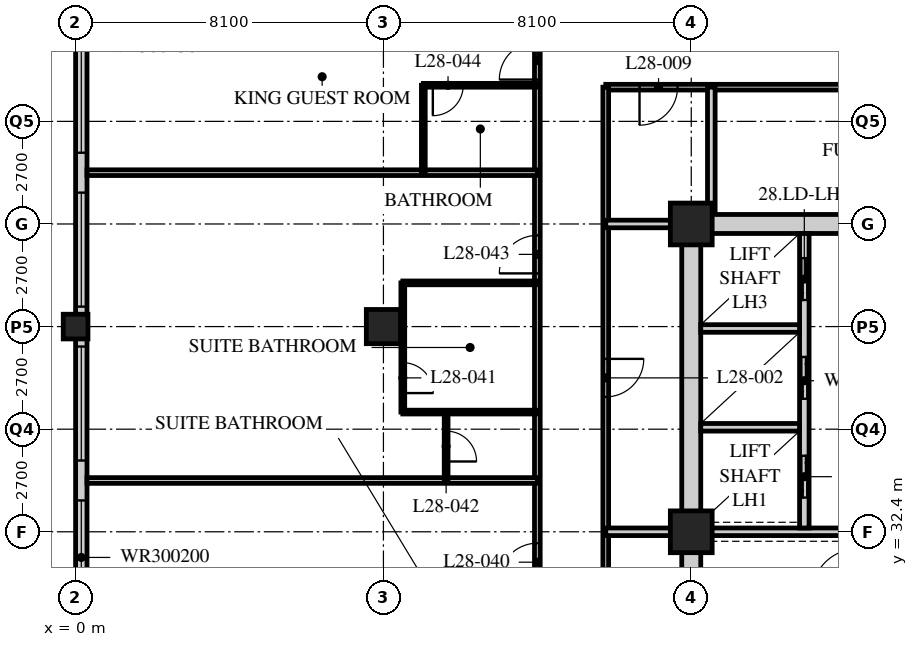
"""IFC4 building model, lengths in metres.
Left out: names, types, materials, properties, quantities, classifications, styles, units other than length and angle.
Written with IfcOpenShell. Run it as: python <this file> out.ifc"""

import sys

from ifc_helpers import new_model, si_unit, direction, frame, frame_2d, origin, origin_2d, place, context, subcontext, project, spatial, rectangle, hollow_rectangle, extrude, element, fill, save


model = new_model("IFC4")
c1 = context("Model", 3, precision=1e-05, world=origin(), true_north=direction((0.0, 1.0)))
c2 = subcontext(c1, "Body", "Model", "MODEL_VIEW")
j1 = project(units=[si_unit("LENGTHUNIT", "METRE"), si_unit("PLANEANGLEUNIT", "RADIAN")], contexts=[c1])
p1 = place(None, origin())
s1 = spatial("IfcSite", under=j1, at=p1, CompositionType="ELEMENT")
p2 = place(p1, origin())
s2 = spatial("IfcBuilding", under=s1, at=p2, CompositionType="ELEMENT")
p3 = place(p2, frame((0.0, 0.0, 113.6)))
s3 = spatial("IfcBuildingStorey", under=s2, at=p3, CompositionType="ELEMENT", Elevation=113.6)
p4 = place(p3, frame((0.0, 37.8, 0.0), z_axis=(0.0, 0.0, 1.0), x_axis=(1.0, 0.0, 0.0)))
e1 = element("IfcColumn", 1, at=p4, inside=s3, PredefinedType="COLUMN", context=c2, shape_type="SweptSolid", body=[
    extrude(hollow_rectangle(XDim=0.65, YDim=0.65, WallThickness=0.055, at=origin_2d()), origin(), (0.0, 0.0, 1.0), 3.4),
])
p5 = place(p3, frame((8.1, 37.8, 0.0), z_axis=(0.0, 0.0, 1.0), x_axis=(1.0, 0.0, 0.0)))
e2 = element("IfcColumn", 2, at=p5, inside=s3, PredefinedType="COLUMN", context=c2, shape_type="SweptSolid", body=[
    extrude(hollow_rectangle(XDim=0.9, YDim=0.9, WallThickness=0.09, at=origin_2d()), origin(), (0.0, 0.0, 1.0), 3.4),
])
for number, where, z_axis, x_axis in (
    (3, (16.2, 32.4, 0.0), (0.0, 0.0, 1.0), (1.0, 0.0, 0.0)),
    (4, (16.2, 40.5, 0.0), (0.0, 0.0, 1.0), (1.0, 0.0, 0.0)),
):
    element("IfcColumn", number, at=place(p3, frame(where, z_axis=z_axis, x_axis=x_axis)), inside=s3, PredefinedType="COLUMN", context=c2, shape_type="SweptSolid", body=[
        extrude(hollow_rectangle(XDim=1.1, YDim=1.1, WallThickness=0.1, at=origin_2d()), origin(), (0.0, 0.0, 1.0), 3.4),
    ])
p6 = place(p3, frame((0.15, 45.6, 0.0), z_axis=(0.0, 0.0, 1.0), x_axis=(0.0, -1.0, 0.0)))
e5 = element("IfcWall", 5, at=p6, inside=s3, PredefinedType="SOLIDWALL", context=c2, shape_type="SweptSolid", body=[
    extrude(rectangle(XDim=32.1, YDim=0.3, at=frame_2d((16.05, 0.0))), origin(), (0.0, 0.0, 1.0), 3.19),
])
p7 = place(p6, frame((0.225, 0.0, 0.9)))
e6 = element("IfcOpeningElement", 6, at=p7, cuts=e5, PredefinedType="OPENING", context=c2, shape_type="SweptSolid", body=[
    extrude(rectangle(XDim=3.0, YDim=2.0, at=frame_2d((1.5, 1.0))), frame((0.0, 0.16, 0.0), z_axis=(0.0, -1.0, 0.0), x_axis=(1.0, 0.0, 0.0)), (0.0, 0.0, 1.0), 0.32),
])
p8 = place(p6, frame((4.275, 0.0, 0.9)))
e7 = element("IfcOpeningElement", 7, at=p8, cuts=e5, PredefinedType="OPENING", context=c2, shape_type="SweptSolid", body=[
    extrude(rectangle(XDim=3.0, YDim=2.0, at=frame_2d((1.5, 1.0))), frame((0.0, 0.16, 0.0), z_axis=(0.0, -1.0, 0.0), x_axis=(1.0, 0.0, 0.0)), (0.0, 0.0, 1.0), 0.32),
])
p9 = place(p6, frame((8.325, 0.0, 0.9)))
e8 = element("IfcOpeningElement", 8, at=p9, cuts=e5, PredefinedType="OPENING", context=c2, shape_type="SweptSolid", body=[
    extrude(rectangle(XDim=3.0, YDim=2.0, at=frame_2d((1.5, 1.0))), frame((0.0, 0.16, 0.0), z_axis=(0.0, -1.0, 0.0), x_axis=(1.0, 0.0, 0.0)), (0.0, 0.0, 1.0), 0.32),
])
p10 = place(p6, frame((12.375, 0.0, 0.9)))
e9 = element("IfcOpeningElement", 9, at=p10, cuts=e5, PredefinedType="OPENING", context=c2, shape_type="SweptSolid", body=[
    extrude(rectangle(XDim=3.0, YDim=2.0, at=frame_2d((1.5, 1.0))), frame((0.0, 0.16, 0.0), z_axis=(0.0, -1.0, 0.0), x_axis=(1.0, 0.0, 0.0)), (0.0, 0.0, 1.0), 0.32),
])
p11 = place(p6, frame((16.425, 0.0, 0.9)))
e10 = element("IfcOpeningElement", 10, at=p11, cuts=e5, PredefinedType="OPENING", context=c2, shape_type="SweptSolid", body=[
    extrude(rectangle(XDim=3.0, YDim=2.0, at=frame_2d((1.5, 1.0))), frame((0.0, 0.16, 0.0), z_axis=(0.0, -1.0, 0.0), x_axis=(1.0, 0.0, 0.0)), (0.0, 0.0, 1.0), 0.32),
])
p12 = place(p6, frame((20.475, 0.0, 0.9)))
e11 = element("IfcOpeningElement", 11, at=p12, cuts=e5, PredefinedType="OPENING", context=c2, shape_type="SweptSolid", body=[
    extrude(rectangle(XDim=3.0, YDim=2.0, at=frame_2d((1.5, 1.0))), frame((0.0, 0.16, 0.0), z_axis=(0.0, -1.0, 0.0), x_axis=(1.0, 0.0, 0.0)), (0.0, 0.0, 1.0), 0.32),
])
p13 = place(p6, frame((24.525, 0.0, 0.9)))
e12 = element("IfcOpeningElement", 12, at=p13, cuts=e5, PredefinedType="OPENING", context=c2, shape_type="SweptSolid", body=[
    extrude(rectangle(XDim=3.0, YDim=2.0, at=frame_2d((1.5, 1.0))), frame((0.0, 0.16, 0.0), z_axis=(0.0, -1.0, 0.0), x_axis=(1.0, 0.0, 0.0)), (0.0, 0.0, 1.0), 0.32),
])
p14 = place(p6, frame((28.575, 0.0, 0.9)))
e13 = element("IfcOpeningElement", 13, at=p14, cuts=e5, PredefinedType="OPENING", context=c2, shape_type="SweptSolid", body=[
    extrude(rectangle(XDim=3.0, YDim=2.0, at=frame_2d((1.5, 1.0))), frame((0.0, 0.16, 0.0), z_axis=(0.0, -1.0, 0.0), x_axis=(1.0, 0.0, 0.0)), (0.0, 0.0, 1.0), 0.32),
])
p15 = place(p3, frame((12.15, 17.55, 0.0), z_axis=(0.0, 0.0, 1.0), x_axis=(0.0, 1.0, 0.0)))
e14 = element("IfcWall", 14, at=p15, inside=s3, PredefinedType="PARTITIONING", context=c2, shape_type="SweptSolid", body=[
    extrude(rectangle(XDim=28.35, YDim=0.15, at=frame_2d((14.175, 0.0))), origin(), (0.0, 0.0, 1.0), 3.19),
])
p16 = place(p15, frame((5.45, 0.0, 0.0)))
e15 = element("IfcOpeningElement", 15, at=p16, cuts=e14, PredefinedType="OPENING", context=c2, shape_type="SweptSolid", body=[
    extrude(rectangle(XDim=1.0, YDim=2.1, at=frame_2d((0.5, 1.05))), frame((0.0, 0.085, 0.0), z_axis=(0.0, -1.0, 0.0), x_axis=(1.0, 0.0, 0.0)), (0.0, 0.0, 1.0), 0.17),
])
p17 = place(p15, frame((13.55, 0.0, 0.0)))
e16 = element("IfcOpeningElement", 16, at=p17, cuts=e14, PredefinedType="OPENING", context=c2, shape_type="SweptSolid", body=[
    extrude(rectangle(XDim=1.0, YDim=2.1, at=frame_2d((0.5, 1.05))), frame((0.0, 0.085, 0.0), z_axis=(0.0, -1.0, 0.0), x_axis=(1.0, 0.0, 0.0)), (0.0, 0.0, 1.0), 0.17),
])
p18 = place(p15, frame((21.65, 0.0, 0.0)))
e17 = element("IfcOpeningElement", 17, at=p18, cuts=e14, PredefinedType="OPENING", context=c2, shape_type="SweptSolid", body=[
    extrude(rectangle(XDim=1.0, YDim=2.1, at=frame_2d((0.5, 1.05))), frame((0.0, 0.085, 0.0), z_axis=(0.0, -1.0, 0.0), x_axis=(1.0, 0.0, 0.0)), (0.0, 0.0, 1.0), 0.17),
])
p19 = place(p15, frame((26.75, 0.0, 0.0)))
e18 = element("IfcOpeningElement", 18, at=p19, cuts=e14, PredefinedType="OPENING", context=c2, shape_type="SweptSolid", body=[
    extrude(rectangle(XDim=1.0, YDim=2.1, at=frame_2d((0.5, 1.05))), frame((0.0, 0.085, 0.0), z_axis=(0.0, -1.0, 0.0), x_axis=(1.0, 0.0, 0.0)), (0.0, 0.0, 1.0), 0.17),
])
p20 = place(p3, frame((27.14, 44.1, 0.0), z_axis=(0.0, 0.0, 1.0), x_axis=(-1.0, 0.0, 0.0)))
e19 = element("IfcWall", 19, at=p20, inside=s3, PredefinedType="PARTITIONING", context=c2, shape_type="SweptSolid", body=[
    extrude(rectangle(XDim=13.19, YDim=0.15, at=frame_2d((6.595, 0.0))), origin(), (0.0, 0.0, 1.0), 3.19),
])
p21 = place(p20, frame((11.301, 0.0, 0.0)))
e20 = element("IfcOpeningElement", 20, at=p21, cuts=e19, PredefinedType="OPENING", context=c2, shape_type="SweptSolid", body=[
    extrude(rectangle(XDim=1.0, YDim=2.1, at=frame_2d((0.5, 1.05))), frame((0.0, 0.085, 0.0), z_axis=(0.0, -1.0, 0.0), x_axis=(1.0, 0.0, 0.0)), (0.0, 0.0, 1.0), 0.17),
])
p22 = place(p20, frame((4.701, 0.0, 0.0)))
e21 = element("IfcOpeningElement", 21, at=p22, cuts=e19, PredefinedType="OPENING", context=c2, shape_type="SweptSolid", body=[
    extrude(rectangle(XDim=1.0, YDim=2.1, at=frame_2d((0.5, 1.05))), frame((0.0, 0.085, 0.0), z_axis=(0.0, -1.0, 0.0), x_axis=(1.0, 0.0, 0.0)), (0.0, 0.0, 1.0), 0.17),
])
p23 = place(p3, frame((13.95, 44.1, 0.0), z_axis=(0.0, 0.0, 1.0), x_axis=(0.0, -1.0, 0.0)))
e22 = element("IfcWall", 22, at=p23, inside=s3, PredefinedType="PARTITIONING", context=c2, shape_type="SweptSolid", body=[
    extrude(rectangle(XDim=24.75, YDim=0.15, at=frame_2d((12.375, 0.0))), origin(), (0.0, 0.0, 1.0), 3.19),
])
p24 = place(p23, frame((15.25, 0.0, 0.0)))
e23 = element("IfcOpeningElement", 23, at=p24, cuts=e22, PredefinedType="OPENING", context=c2, shape_type="SweptSolid", body=[
    extrude(rectangle(XDim=1.0, YDim=2.1, at=frame_2d((0.5, 1.05))), frame((0.0, 0.085, 0.0), z_axis=(0.0, -1.0, 0.0), x_axis=(1.0, 0.0, 0.0)), (0.0, 0.0, 1.0), 0.17),
])
p25 = place(p23, frame((7.15, 0.0, 0.0)))
e24 = element("IfcOpeningElement", 24, at=p25, cuts=e22, PredefinedType="OPENING", context=c2, shape_type="SweptSolid", body=[
    extrude(rectangle(XDim=1.0, YDim=2.1, at=frame_2d((0.5, 1.05))), frame((0.0, 0.085, 0.0), z_axis=(0.0, -1.0, 0.0), x_axis=(1.0, 0.0, 0.0)), (0.0, 0.0, 1.0), 0.17),
])
p26 = place(p3, frame((13.95, 32.4, 0.0), z_axis=(0.0, 0.0, 1.0), x_axis=(1.0, 0.0, 0.0)))
e25 = element("IfcWall", 25, at=p26, inside=s3, PredefinedType="SOLIDWALL", context=c2, shape_type="SweptSolid", body=[
    extrude(rectangle(XDim=2.25, YDim=0.2, at=frame_2d((1.125, 0.0))), origin(), (0.0, 0.0, 1.0), 3.19),
])
p27 = place(p3, frame((16.728, 44.1, 0.0), z_axis=(0.0, 0.0, 1.0), x_axis=(0.0, -1.0, 0.0)))
e26 = element("IfcWall", 26, at=p27, inside=s3, PredefinedType="SOLIDWALL", context=c2, shape_type="SweptSolid", body=[
    extrude(rectangle(XDim=3.6, YDim=0.2, at=frame_2d((1.8, 0.0))), origin(), (0.0, 0.0, 1.0), 3.19),
])
p28 = place(p3, frame((13.95, 40.5, 0.0), z_axis=(0.0, 0.0, 1.0), x_axis=(1.0, 0.0, 0.0)))
e27 = element("IfcWall", 27, at=p28, inside=s3, PredefinedType="SOLIDWALL", context=c2, shape_type="SweptSolid", body=[
    extrude(rectangle(XDim=2.25, YDim=0.2, at=frame_2d((1.125, 0.0))), origin(), (0.0, 0.0, 1.0), 3.19),
])
p29 = place(p3, frame((12.15, 33.75, 0.0), z_axis=(0.0, 0.0, 1.0), x_axis=(-1.0, 0.0, 0.0)))
e28 = element("IfcWall", 28, at=p29, inside=s3, PredefinedType="PARTITIONING", context=c2, shape_type="SweptSolid", body=[
    extrude(rectangle(XDim=11.85, YDim=0.15, at=frame_2d((5.925, 0.0))), origin(), (0.0, 0.0, 1.0), 3.19),
])
p30 = place(p3, frame((8.61, 35.55, 0.0), z_axis=(0.0, 0.0, 1.0), x_axis=(0.0, 1.0, 0.0)))
e29 = element("IfcWall", 29, at=p30, inside=s3, PredefinedType="PARTITIONING", context=c2, shape_type="SweptSolid", body=[
    extrude(rectangle(XDim=3.4, YDim=0.1, at=frame_2d((1.7, 0.0))), origin(), (0.0, 0.0, 1.0), 3.19),
])
p31 = place(p30, frame((0.5, 0.0, 0.0)))
e30 = element("IfcOpeningElement", 30, at=p31, cuts=e29, PredefinedType="OPENING", context=c2, shape_type="SweptSolid", body=[
    extrude(rectangle(XDim=0.8, YDim=2.1, at=frame_2d((0.4, 1.05))), frame((0.0, 0.06, 0.0), z_axis=(0.0, -1.0, 0.0), x_axis=(1.0, 0.0, 0.0)), (0.0, 0.0, 1.0), 0.12),
])
p32 = place(p3, frame((9.75, 33.75, 0.0), z_axis=(0.0, 0.0, 1.0), x_axis=(0.0, 1.0, 0.0)))
e31 = element("IfcWall", 31, at=p32, inside=s3, PredefinedType="PARTITIONING", context=c2, shape_type="SweptSolid", body=[
    extrude(rectangle(XDim=1.8, YDim=0.1, at=frame_2d((0.9, 0.0))), origin(), (0.0, 0.0, 1.0), 3.19),
])
p33 = place(p32, frame((0.5, 0.0, 0.0)))
e32 = element("IfcOpeningElement", 32, at=p33, cuts=e31, PredefinedType="OPENING", context=c2, shape_type="SweptSolid", body=[
    extrude(rectangle(XDim=0.8, YDim=2.1, at=frame_2d((0.4, 1.05))), frame((0.0, 0.06, 0.0), z_axis=(0.0, -1.0, 0.0), x_axis=(1.0, 0.0, 0.0)), (0.0, 0.0, 1.0), 0.12),
])
for number, where, z_axis, x_axis in (
    (33, (12.15, 35.55, 0.0), (0.0, 0.0, 1.0), (-1.0, 0.0, 0.0)),
    (34, (12.15, 38.95, 0.0), (0.0, 0.0, 1.0), (-1.0, 0.0, 0.0)),
):
    element("IfcWall", number, at=place(p3, frame(where, z_axis=z_axis, x_axis=x_axis)), inside=s3, PredefinedType="PARTITIONING", context=c2, shape_type="SweptSolid", body=[
        extrude(rectangle(XDim=3.54, YDim=0.1, at=frame_2d((1.77, 0.0))), origin(), (0.0, 0.0, 1.0), 3.19),
    ])
p34 = place(p3, frame((12.15, 41.85, 0.0), z_axis=(0.0, 0.0, 1.0), x_axis=(-1.0, 0.0, 0.0)))
e35 = element("IfcWall", 35, at=p34, inside=s3, PredefinedType="PARTITIONING", context=c2, shape_type="SweptSolid", body=[
    extrude(rectangle(XDim=11.85, YDim=0.15, at=frame_2d((5.925, 0.0))), origin(), (0.0, 0.0, 1.0), 3.19),
])
p35 = place(p3, frame((9.15, 41.85, 0.0), z_axis=(0.0, 0.0, 1.0), x_axis=(0.0, 1.0, 0.0)))
e36 = element("IfcWall", 36, at=p35, inside=s3, PredefinedType="PARTITIONING", context=c2, shape_type="SweptSolid", body=[
    extrude(rectangle(XDim=2.3, YDim=0.1, at=frame_2d((1.15, 0.0))), origin(), (0.0, 0.0, 1.0), 3.19),
])
p36 = place(p3, frame((12.15, 44.15, 0.0), z_axis=(0.0, 0.0, 1.0), x_axis=(-1.0, 0.0, 0.0)))
e37 = element("IfcWall", 37, at=p36, inside=s3, PredefinedType="PARTITIONING", context=c2, shape_type="SweptSolid", body=[
    extrude(rectangle(XDim=3.0, YDim=0.1, at=frame_2d((1.5, 0.0))), origin(), (0.0, 0.0, 1.0), 3.19),
])
p37 = place(p36, frame((1.95, 0.0, 0.0)))
e38 = element("IfcOpeningElement", 38, at=p37, cuts=e37, PredefinedType="OPENING", context=c2, shape_type="SweptSolid", body=[
    extrude(rectangle(XDim=0.8, YDim=2.1, at=frame_2d((0.4, 1.05))), frame((0.0, 0.06, 0.0), z_axis=(0.0, -1.0, 0.0), x_axis=(1.0, 0.0, 0.0)), (0.0, 0.0, 1.0), 0.12),
])
p38 = place(p3, frame((15.95, 40.5, 0.0), z_axis=(0.0, 0.0, 1.0), x_axis=(1.0, 0.0, 0.0)))
e39 = element("IfcWall", 39, at=p38, inside=s3, PredefinedType="SOLIDWALL", context=c2, shape_type="SweptSolid", body=[
    extrude(rectangle(XDim=24.8, YDim=0.5, at=frame_2d((12.4, 0.0))), origin(), (0.0, 0.0, 1.0), 2.54),
])
p39 = place(p38, frame((11.5, 0.0, 0.0)))
e40 = element("IfcOpeningElement", 40, at=p39, cuts=e39, PredefinedType="OPENING", context=c2, shape_type="SweptSolid", body=[
    extrude(rectangle(XDim=1.8, YDim=2.4, at=frame_2d((0.9, 1.2))), frame((0.0, 0.26, 0.0), z_axis=(0.0, -1.0, 0.0), x_axis=(1.0, 0.0, 0.0)), (0.0, 0.0, 1.0), 0.52),
])
p40 = place(p3, frame((16.2, 24.55, 0.0), z_axis=(0.0, 0.0, 1.0), x_axis=(0.0, 1.0, 0.0)))
e41 = element("IfcWall", 41, at=p40, inside=s3, PredefinedType="SOLIDWALL", context=c2, shape_type="SweptSolid", body=[
    extrude(rectangle(XDim=15.7, YDim=0.5, at=frame_2d((7.85, 0.0))), origin(), (0.0, 0.0, 1.0), 2.578),
])
p41 = place(p3, frame((16.45, 32.4, 0.0), z_axis=(0.0, 0.0, 1.0), x_axis=(1.0, 0.0, 0.0)))
e42 = element("IfcWall", 42, at=p41, inside=s3, PredefinedType="SOLIDWALL", context=c2, shape_type="SweptSolid", body=[
    extrude(rectangle(XDim=7.95, YDim=0.2, at=frame_2d((3.975, 0.0))), origin(), (0.0, 0.0, 1.0), 2.578),
])
p42 = place(p3, frame((19.175, 32.5, 0.0), z_axis=(0.0, 0.0, 1.0), x_axis=(0.0, 1.0, 0.0)))
e43 = element("IfcWall", 43, at=p42, inside=s3, PredefinedType="SOLIDWALL", context=c2, shape_type="SweptSolid", body=[
    extrude(rectangle(XDim=7.75, YDim=0.25, at=frame_2d((3.875, 0.0))), origin(), (0.0, 0.0, 1.0), 3.19),
])
p43 = place(p42, frame((0.8, 0.0, 0.0)))
e44 = element("IfcOpeningElement", 44, at=p43, cuts=e43, PredefinedType="OPENING", context=c2, shape_type="SweptSolid", body=[
    extrude(rectangle(XDim=1.1, YDim=2.4, at=frame_2d((0.55, 1.2))), frame((0.0, 0.135, 0.0), z_axis=(0.0, -1.0, 0.0), x_axis=(1.0, 0.0, 0.0)), (0.0, 0.0, 1.0), 0.27),
])
p44 = place(p42, frame((3.4, 0.0, 0.0)))
e45 = element("IfcOpeningElement", 45, at=p44, cuts=e43, PredefinedType="OPENING", context=c2, shape_type="SweptSolid", body=[
    extrude(rectangle(XDim=1.1, YDim=2.4, at=frame_2d((0.55, 1.2))), frame((0.0, 0.135, 0.0), z_axis=(0.0, -1.0, 0.0), x_axis=(1.0, 0.0, 0.0)), (0.0, 0.0, 1.0), 0.27),
])
p45 = place(p42, frame((6.0, 0.0, 0.0)))
e46 = element("IfcOpeningElement", 46, at=p45, cuts=e43, PredefinedType="OPENING", context=c2, shape_type="SweptSolid", body=[
    extrude(rectangle(XDim=1.1, YDim=2.4, at=frame_2d((0.55, 1.2))), frame((0.0, 0.135, 0.0), z_axis=(0.0, -1.0, 0.0), x_axis=(1.0, 0.0, 0.0)), (0.0, 0.0, 1.0), 0.27),
])
for number, where, z_axis, x_axis in (
    (47, (16.45, 35.15, 0.0), (0.0, 0.0, 1.0), (1.0, 0.0, 0.0)),
    (48, (16.45, 37.75, 0.0), (0.0, 0.0, 1.0), (1.0, 0.0, 0.0)),
):
    element("IfcWall", number, at=place(p3, frame(where, z_axis=z_axis, x_axis=x_axis)), inside=s3, PredefinedType="SOLIDWALL", context=c2, shape_type="SweptSolid", body=[
        extrude(rectangle(XDim=2.6, YDim=0.2, at=frame_2d((1.3, 0.0))), origin(), (0.0, 0.0, 1.0), 3.19),
    ])
p46 = place(p7, origin())
e49 = element("IfcWindow", 49, at=p46, inside=s3, PartitioningType="SINGLE_PANEL", PredefinedType="WINDOW", context=c2, shape_type="SweptSolid", body=[
    extrude(rectangle(XDim=3.0, YDim=2.0, at=frame_2d((1.5, 1.0))), frame((0.0, 0.03, 0.0), z_axis=(0.0, -1.0, 0.0), x_axis=(1.0, 0.0, 0.0)), (0.0, 0.0, 1.0), 0.06),
])
fill(e6, e49)
p47 = place(p8, origin())
e50 = element("IfcWindow", 50, at=p47, inside=s3, PartitioningType="SINGLE_PANEL", PredefinedType="WINDOW", context=c2, shape_type="SweptSolid", body=[
    extrude(rectangle(XDim=3.0, YDim=2.0, at=frame_2d((1.5, 1.0))), frame((0.0, 0.03, 0.0), z_axis=(0.0, -1.0, 0.0), x_axis=(1.0, 0.0, 0.0)), (0.0, 0.0, 1.0), 0.06),
])
fill(e7, e50)
p48 = place(p9, origin())
e51 = element("IfcWindow", 51, at=p48, inside=s3, PartitioningType="SINGLE_PANEL", PredefinedType="WINDOW", context=c2, shape_type="SweptSolid", body=[
    extrude(rectangle(XDim=3.0, YDim=2.0, at=frame_2d((1.5, 1.0))), frame((0.0, 0.03, 0.0), z_axis=(0.0, -1.0, 0.0), x_axis=(1.0, 0.0, 0.0)), (0.0, 0.0, 1.0), 0.06),
])
fill(e8, e51)
p49 = place(p10, origin())
e52 = element("IfcWindow", 52, at=p49, inside=s3, PartitioningType="SINGLE_PANEL", PredefinedType="WINDOW", context=c2, shape_type="SweptSolid", body=[
    extrude(rectangle(XDim=3.0, YDim=2.0, at=frame_2d((1.5, 1.0))), frame((0.0, 0.03, 0.0), z_axis=(0.0, -1.0, 0.0), x_axis=(1.0, 0.0, 0.0)), (0.0, 0.0, 1.0), 0.06),
])
fill(e9, e52)
p50 = place(p25, origin())
e53 = element("IfcDoor", 53, at=p50, inside=s3, OperationType="SINGLE_SWING_LEFT", PredefinedType="DOOR", context=c2, shape_type="SweptSolid", body=[
    extrude(rectangle(XDim=1.0, YDim=2.1, at=frame_2d((0.5, 1.05))), frame((0.0, 0.025, 0.0), z_axis=(0.0, -1.0, 0.0), x_axis=(1.0, 0.0, 0.0)), (0.0, 0.0, 1.0), 0.05),
])
fill(e24, e53)
p51 = place(p21, origin())
e54 = element("IfcDoor", 54, at=p51, inside=s3, OperationType="SINGLE_SWING_RIGHT", PredefinedType="DOOR", context=c2, shape_type="SweptSolid", body=[
    extrude(rectangle(XDim=1.0, YDim=2.1, at=frame_2d((0.5, 1.05))), frame((0.0, 0.025, 0.0), z_axis=(0.0, -1.0, 0.0), x_axis=(1.0, 0.0, 0.0)), (0.0, 0.0, 1.0), 0.05),
])
fill(e20, e54)
p52 = place(p17, origin())
e55 = element("IfcDoor", 55, at=p52, inside=s3, OperationType="SINGLE_SWING_LEFT", PredefinedType="DOOR", context=c2, shape_type="SweptSolid", body=[
    extrude(rectangle(XDim=1.0, YDim=2.1, at=frame_2d((0.5, 1.05))), frame((0.0, 0.025, 0.0), z_axis=(0.0, -1.0, 0.0), x_axis=(1.0, 0.0, 0.0)), (0.0, 0.0, 1.0), 0.05),
])
fill(e16, e55)
p53 = place(p31, origin())
e56 = element("IfcDoor", 56, at=p53, inside=s3, OperationType="SINGLE_SWING_RIGHT", PredefinedType="DOOR", context=c2, shape_type="SweptSolid", body=[
    extrude(rectangle(XDim=0.8, YDim=2.1, at=frame_2d((0.4, 1.05))), frame((0.0, 0.025, 0.0), z_axis=(0.0, -1.0, 0.0), x_axis=(1.0, 0.0, 0.0)), (0.0, 0.0, 1.0), 0.05),
])
fill(e30, e56)
p54 = place(p33, origin())
e57 = element("IfcDoor", 57, at=p54, inside=s3, OperationType="SINGLE_SWING_RIGHT", PredefinedType="DOOR", context=c2, shape_type="SweptSolid", body=[
    extrude(rectangle(XDim=0.8, YDim=2.1, at=frame_2d((0.4, 1.05))), frame((0.0, 0.025, 0.0), z_axis=(0.0, -1.0, 0.0), x_axis=(1.0, 0.0, 0.0)), (0.0, 0.0, 1.0), 0.05),
])
fill(e32, e57)
p55 = place(p18, origin())
e58 = element("IfcDoor", 58, at=p55, inside=s3, OperationType="SINGLE_SWING_LEFT", PredefinedType="DOOR", context=c2, shape_type="SweptSolid", body=[
    extrude(rectangle(XDim=1.0, YDim=2.1, at=frame_2d((0.5, 1.05))), frame((0.0, 0.025, 0.0), z_axis=(0.0, -1.0, 0.0), x_axis=(1.0, 0.0, 0.0)), (0.0, 0.0, 1.0), 0.05),
])
fill(e17, e58)
p56 = place(p37, origin())
e59 = element("IfcDoor", 59, at=p56, inside=s3, OperationType="SINGLE_SWING_RIGHT", PredefinedType="DOOR", context=c2, shape_type="SweptSolid", body=[
    extrude(rectangle(XDim=0.8, YDim=2.1, at=frame_2d((0.4, 1.05))), frame((0.0, 0.025, 0.0), z_axis=(0.0, -1.0, 0.0), x_axis=(1.0, 0.0, 0.0)), (0.0, 0.0, 1.0), 0.05),
])
fill(e38, e59)
p57 = place(p19, origin())
e60 = element("IfcDoor", 60, at=p57, inside=s3, OperationType="SINGLE_SWING_LEFT", PredefinedType="DOOR", context=c2, shape_type="SweptSolid", body=[
    extrude(rectangle(XDim=1.0, YDim=2.1, at=frame_2d((0.5, 1.05))), frame((0.0, 0.025, 0.0), z_axis=(0.0, -1.0, 0.0), x_axis=(1.0, 0.0, 0.0)), (0.0, 0.0, 1.0), 0.05),
])
fill(e18, e60)
p58 = place(p43, origin())
e61 = element("IfcDoor", 61, at=p58, inside=s3, OperationType="DOUBLE_DOOR_SLIDING", PredefinedType="DOOR", context=c2, shape_type="SweptSolid", body=[
    extrude(rectangle(XDim=1.1, YDim=2.4, at=frame_2d((0.55, 1.2))), frame((0.0, 0.025, 0.0), z_axis=(0.0, -1.0, 0.0), x_axis=(1.0, 0.0, 0.0)), (0.0, 0.0, 1.0), 0.05),
])
fill(e44, e61)
p59 = place(p44, origin())
e62 = element("IfcDoor", 62, at=p59, inside=s3, OperationType="DOUBLE_DOOR_SLIDING", PredefinedType="DOOR", context=c2, shape_type="SweptSolid", body=[
    extrude(rectangle(XDim=1.1, YDim=2.4, at=frame_2d((0.55, 1.2))), frame((0.0, 0.025, 0.0), z_axis=(0.0, -1.0, 0.0), x_axis=(1.0, 0.0, 0.0)), (0.0, 0.0, 1.0), 0.05),
])
fill(e45, e62)
p60 = place(p45, origin())
e63 = element("IfcDoor", 63, at=p60, inside=s3, OperationType="DOUBLE_DOOR_SLIDING", PredefinedType="DOOR", context=c2, shape_type="SweptSolid", body=[
    extrude(rectangle(XDim=1.1, YDim=2.4, at=frame_2d((0.55, 1.2))), frame((0.0, 0.025, 0.0), z_axis=(0.0, -1.0, 0.0), x_axis=(1.0, 0.0, 0.0)), (0.0, 0.0, 1.0), 0.05),
])
fill(e46, e63)
save(model, sys.argv[1])
